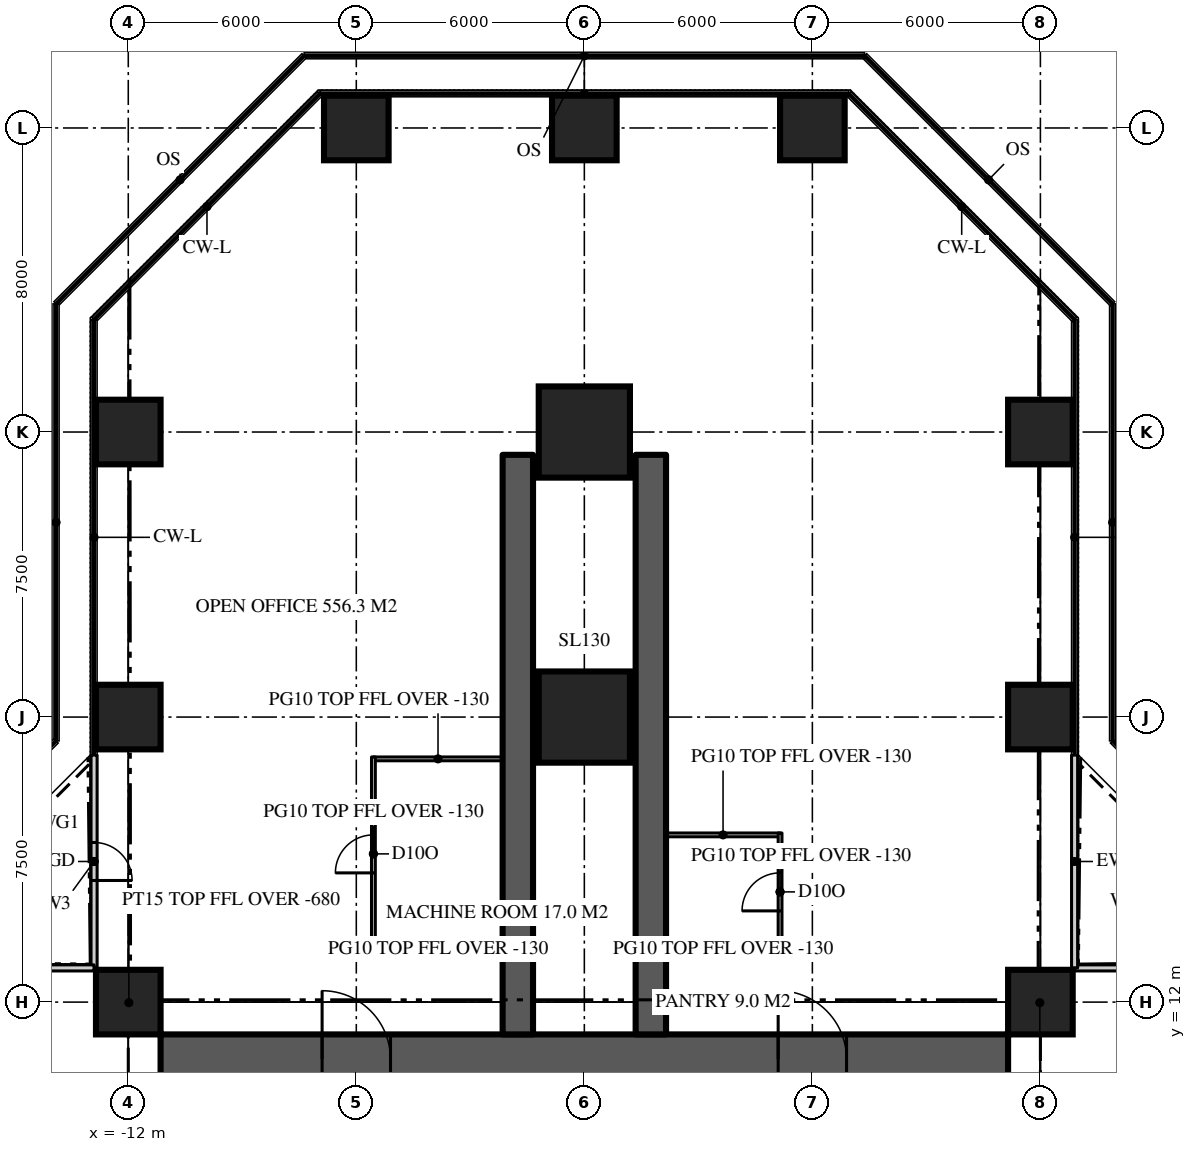
"""IFC4 building model, lengths in metres.
Left out: names, types, materials, properties, quantities, classifications, styles, units other than length and angle.
Written with IfcOpenShell. Run it as: python <this file> out.ifc"""

import sys

from ifc_helpers import new_model, si_unit, direction, frame, frame_2d, origin, origin_2d, place, context, subcontext, project, spatial, rectangle, extrude, element, fill, save


model = new_model("IFC4")
c1 = context("Model", 3, precision=1e-05, world=origin(), true_north=direction((0.0, 1.0)))
c2 = subcontext(c1, "Body", "Model", "MODEL_VIEW")
j1 = project(units=[si_unit("LENGTHUNIT", "METRE"), si_unit("PLANEANGLEUNIT", "RADIAN")], contexts=[c1])
p1 = place(None, origin())
s1 = spatial("IfcSite", under=j1, at=p1, CompositionType="ELEMENT")
p2 = place(p1, origin())
s2 = spatial("IfcBuilding", under=s1, at=p2, CompositionType="ELEMENT")
p3 = place(p2, frame((0.0, 0.0, 55.2)))
s3 = spatial("IfcBuildingStorey", under=s2, at=p3, CompositionType="ELEMENT", Elevation=55.2)
p4 = place(p3, frame((-11.15, 10.5, 0.0), z_axis=(0.0, 0.0, 1.0), x_axis=(1.0, 0.0, 0.0)))
e1 = element("IfcWall", 1, at=p4, inside=s3, PredefinedType="SHEAR", context=c2, shape_type="SweptSolid", body=[
    extrude(rectangle(XDim=22.3, YDim=1.3, at=frame_2d((11.15, 0.0))), origin(), (0.0, 0.0, 1.0), 3.9),
])
p5 = place(p4, frame((4.25, 0.0, 0.0)))
e2 = element("IfcOpeningElement", 2, at=p5, cuts=e1, PredefinedType="OPENING", context=c2, shape_type="SweptSolid", body=[
    extrude(rectangle(XDim=1.8, YDim=2.2, at=frame_2d((0.9, 1.1))), frame((0.0, 0.66, 0.0), z_axis=(0.0, -1.0, 0.0), x_axis=(1.0, 0.0, 0.0)), (0.0, 0.0, 1.0), 1.32),
])
p6 = place(p4, frame((16.25, 0.0, 0.0)))
e3 = element("IfcOpeningElement", 3, at=p6, cuts=e1, PredefinedType="OPENING", context=c2, shape_type="SweptSolid", body=[
    extrude(rectangle(XDim=1.8, YDim=2.2, at=frame_2d((0.9, 1.1))), frame((0.0, 0.66, 0.0), z_axis=(0.0, -1.0, 0.0), x_axis=(1.0, 0.0, 0.0)), (0.0, 0.0, 1.0), 1.32),
])
for number, where, z_axis, x_axis in (
    (4, (1.75, 11.15, 0.0), (0.0, 0.0, 1.0), (0.0, 1.0, 0.0)),
    (5, (-1.75, 11.15, 0.0), (0.0, 0.0, 1.0), (0.0, 1.0, 0.0)),
):
    element("IfcWall", number, at=place(p3, frame(where, z_axis=z_axis, x_axis=x_axis)), inside=s3, PredefinedType="SHEAR", context=c2, shape_type="SweptSolid", body=[
        extrude(rectangle(XDim=15.25, YDim=0.8, at=frame_2d((7.625, 0.0))), origin(), (0.0, 0.0, 1.0), 3.9),
    ])
for number, where, z_axis, x_axis in (
    (6, (-12.0, 12.0, 0.0), (0.0, 0.0, 1.0), (1.0, 0.0, 0.0)),
    (7, (12.0, 12.0, 0.0), (0.0, 0.0, 1.0), (1.0, 0.0, 0.0)),
    (8, (-12.0, 19.5, 0.0), (0.0, 0.0, 1.0), (1.0, 0.0, 0.0)),
):
    element("IfcColumn", number, at=place(p3, frame(where, z_axis=z_axis, x_axis=x_axis)), inside=s3, PredefinedType="COLUMN", context=c2, shape_type="SweptSolid", body=[
        extrude(rectangle(XDim=1.7, YDim=1.7, at=origin_2d()), origin(), (0.0, 0.0, 1.0), 3.9),
    ])
p7 = place(p3, frame((0.0, 19.5, 0.0), z_axis=(0.0, 0.0, 1.0), x_axis=(1.0, 0.0, 0.0)))
e9 = element("IfcColumn", 9, at=p7, inside=s3, PredefinedType="COLUMN", context=c2, shape_type="SweptSolid", body=[
    extrude(rectangle(XDim=2.4, YDim=2.4, at=origin_2d()), origin(), (0.0, 0.0, 1.0), 3.9),
])
for number, where, z_axis, x_axis in (
    (10, (12.0, 19.5, 0.0), (0.0, 0.0, 1.0), (1.0, 0.0, 0.0)),
    (11, (-12.0, 27.0, 0.0), (0.0, 0.0, 1.0), (1.0, 0.0, 0.0)),
):
    element("IfcColumn", number, at=place(p3, frame(where, z_axis=z_axis, x_axis=x_axis)), inside=s3, PredefinedType="COLUMN", context=c2, shape_type="SweptSolid", body=[
        extrude(rectangle(XDim=1.7, YDim=1.7, at=origin_2d()), origin(), (0.0, 0.0, 1.0), 3.9),
    ])
p8 = place(p3, frame((0.0, 27.0, 0.0), z_axis=(0.0, 0.0, 1.0), x_axis=(1.0, 0.0, 0.0)))
e12 = element("IfcColumn", 12, at=p8, inside=s3, PredefinedType="COLUMN", context=c2, shape_type="SweptSolid", body=[
    extrude(rectangle(XDim=2.4, YDim=2.4, at=origin_2d()), origin(), (0.0, 0.0, 1.0), 3.9),
])
for number, where, z_axis, x_axis in (
    (13, (12.0, 27.0, 0.0), (0.0, 0.0, 1.0), (1.0, 0.0, 0.0)),
    (14, (-6.0, 35.0, 0.0), (0.0, 0.0, 1.0), (1.0, 0.0, 0.0)),
    (15, (0.0, 35.0, 0.0), (0.0, 0.0, 1.0), (1.0, 0.0, 0.0)),
    (16, (6.0, 35.0, 0.0), (0.0, 0.0, 1.0), (1.0, 0.0, 0.0)),
):
    element("IfcColumn", number, at=place(p3, frame(where, z_axis=z_axis, x_axis=x_axis)), inside=s3, PredefinedType="COLUMN", context=c2, shape_type="SweptSolid", body=[
        extrude(rectangle(XDim=1.7, YDim=1.7, at=origin_2d()), origin(), (0.0, 0.0, 1.0), 3.9),
    ])
p9 = place(p3, frame((18.5, 12.9, 0.0), z_axis=(0.0, 0.0, 1.0), x_axis=(-1.0, 0.0, 0.0)))
e17 = element("IfcWall", 17, at=p9, inside=s3, PredefinedType="SOLIDWALL", context=c2, shape_type="SweptSolid", body=[
    extrude(rectangle(XDim=5.6, YDim=0.16, at=frame_2d((2.8, 0.0))), origin(), (0.0, 0.0, 1.0), 3.77),
])
p10 = place(p9, frame((2.3, 0.0, 0.0)))
e18 = element("IfcOpeningElement", 18, at=p10, cuts=e17, PredefinedType="OPENING", context=c2, shape_type="SweptSolid", body=[
    extrude(rectangle(XDim=1.0, YDim=2.2, at=frame_2d((0.5, 1.1))), frame((0.0, 0.09, 0.0), z_axis=(0.0, -1.0, 0.0), x_axis=(1.0, 0.0, 0.0)), (0.0, 0.0, 1.0), 0.18),
])
p11 = place(p3, frame((12.9, 12.9, 0.0), z_axis=(0.0, 0.0, 1.0), x_axis=(0.0, 1.0, 0.0)))
e19 = element("IfcWall", 19, at=p11, inside=s3, PredefinedType="SOLIDWALL", context=c2, shape_type="SweptSolid", body=[
    extrude(rectangle(XDim=5.6, YDim=0.16, at=frame_2d((2.8, 0.0))), origin(), (0.0, 0.0, 1.0), 3.77),
])
p12 = place(p3, frame((-12.9, 18.5, 0.0), z_axis=(0.0, 0.0, 1.0), x_axis=(0.0, -1.0, 0.0)))
e20 = element("IfcWall", 20, at=p12, inside=s3, PredefinedType="SOLIDWALL", context=c2, shape_type="SweptSolid", body=[
    extrude(rectangle(XDim=5.6, YDim=0.16, at=frame_2d((2.8, 0.0))), origin(), (0.0, 0.0, 1.0), 3.77),
])
p13 = place(p12, frame((2.3, 0.0, 0.0)))
e21 = element("IfcOpeningElement", 21, at=p13, cuts=e20, PredefinedType="OPENING", context=c2, shape_type="SweptSolid", body=[
    extrude(rectangle(XDim=1.0, YDim=2.2, at=frame_2d((0.5, 1.1))), frame((0.0, 0.09, 0.0), z_axis=(0.0, -1.0, 0.0), x_axis=(1.0, 0.0, 0.0)), (0.0, 0.0, 1.0), 0.18),
])
p14 = place(p3, frame((-12.9, 12.9, 0.0), z_axis=(0.0, 0.0, 1.0), x_axis=(-1.0, 0.0, 0.0)))
e22 = element("IfcWall", 22, at=p14, inside=s3, PredefinedType="SOLIDWALL", context=c2, shape_type="SweptSolid", body=[
    extrude(rectangle(XDim=5.6, YDim=0.16, at=frame_2d((2.8, 0.0))), origin(), (0.0, 0.0, 1.0), 3.77),
])
for number, where, z_axis, x_axis in (
    (23, (-2.15, 13.4, 0.0), (0.0, 0.0, 1.0), (-1.0, 0.0, 0.0)),
    (24, (-2.15, 18.4, 0.0), (0.0, 0.0, 1.0), (-1.0, 0.0, 0.0)),
):
    element("IfcWall", number, at=place(p3, frame(where, z_axis=z_axis, x_axis=x_axis)), inside=s3, PredefinedType="PARTITIONING", context=c2, shape_type="SweptSolid", body=[
        extrude(rectangle(XDim=3.4, YDim=0.1, at=frame_2d((1.7, 0.0))), origin(), (0.0, 0.0, 1.0), 3.77),
    ])
p15 = place(p3, frame((-5.55, 13.35, 0.0), z_axis=(0.0, 0.0, 1.0), x_axis=(0.0, 1.0, 0.0)))
e25 = element("IfcWall", 25, at=p15, inside=s3, PredefinedType="PARTITIONING", context=c2, shape_type="SweptSolid", body=[
    extrude(rectangle(XDim=5.1, YDim=0.1, at=frame_2d((2.55, 0.0))), origin(), (0.0, 0.0, 1.0), 3.77),
])
p16 = place(p15, frame((2.05, 0.0, 0.0)))
e26 = element("IfcOpeningElement", 26, at=p16, cuts=e25, PredefinedType="OPENING", context=c2, shape_type="SweptSolid", body=[
    extrude(rectangle(XDim=1.0, YDim=2.2, at=frame_2d((0.5, 1.1))), frame((0.0, 0.06, 0.0), z_axis=(0.0, -1.0, 0.0), x_axis=(1.0, 0.0, 0.0)), (0.0, 0.0, 1.0), 0.12),
])
for number, where, z_axis, x_axis in (
    (27, (2.15, 13.4, 0.0), (0.0, 0.0, 1.0), (1.0, 0.0, 0.0)),
    (28, (2.15, 16.4, 0.0), (0.0, 0.0, 1.0), (1.0, 0.0, 0.0)),
):
    element("IfcWall", number, at=place(p3, frame(where, z_axis=z_axis, x_axis=x_axis)), inside=s3, PredefinedType="PARTITIONING", context=c2, shape_type="SweptSolid", body=[
        extrude(rectangle(XDim=3.0, YDim=0.1, at=frame_2d((1.5, 0.0))), origin(), (0.0, 0.0, 1.0), 3.77),
    ])
p17 = place(p3, frame((5.15, 13.35, 0.0), z_axis=(0.0, 0.0, 1.0), x_axis=(0.0, 1.0, 0.0)))
e29 = element("IfcWall", 29, at=p17, inside=s3, PredefinedType="PARTITIONING", context=c2, shape_type="SweptSolid", body=[
    extrude(rectangle(XDim=3.1, YDim=0.1, at=frame_2d((1.55, 0.0))), origin(), (0.0, 0.0, 1.0), 3.77),
])
p18 = place(p17, frame((1.05, 0.0, 0.0)))
e30 = element("IfcOpeningElement", 30, at=p18, cuts=e29, PredefinedType="OPENING", context=c2, shape_type="SweptSolid", body=[
    extrude(rectangle(XDim=1.0, YDim=2.2, at=frame_2d((0.5, 1.1))), frame((0.0, 0.06, 0.0), z_axis=(0.0, -1.0, 0.0), x_axis=(1.0, 0.0, 0.0)), (0.0, 0.0, 1.0), 0.12),
])
for number, where, z_axis, x_axis in (
    (31, (11.15, 11.15, 0.0), (0.0, 0.0, 1.0), (0.707, 0.707, 0.0)),
    (32, (-11.15, 11.15, 0.0), (0.0, 0.0, 1.0), (-0.707, 0.707, 0.0)),
):
    element("IfcWall", number, at=place(p3, frame(where, z_axis=z_axis, x_axis=x_axis)), inside=s3, PredefinedType="PARTITIONING", context=c2, shape_type="SweptSolid", body=[
        extrude(rectangle(XDim=2.362, YDim=0.15, at=frame_2d((1.181, 0.0))), origin(), (0.0, 0.0, 1.0), 3.22),
    ])
p19 = place(p13, origin())
e33 = element("IfcDoor", 33, at=p19, inside=s3, OperationType="SINGLE_SWING_RIGHT", PredefinedType="DOOR", context=c2, shape_type="SweptSolid", body=[
    extrude(rectangle(XDim=1.0, YDim=2.2, at=frame_2d((0.5, 1.1))), frame((0.0, 0.025, 0.0), z_axis=(0.0, -1.0, 0.0), x_axis=(1.0, 0.0, 0.0)), (0.0, 0.0, 1.0), 0.05),
])
fill(e21, e33)
p20 = place(p5, origin())
e34 = element("IfcDoor", 34, at=p20, inside=s3, OperationType="DOUBLE_DOOR_DOUBLE_SWING", PredefinedType="DOOR", context=c2, shape_type="SweptSolid", body=[
    extrude(rectangle(XDim=1.8, YDim=2.2, at=frame_2d((0.9, 1.1))), frame((0.0, 0.025, 0.0), z_axis=(0.0, -1.0, 0.0), x_axis=(1.0, 0.0, 0.0)), (0.0, 0.0, 1.0), 0.05),
])
fill(e2, e34)
p21 = place(p6, origin())
e35 = element("IfcDoor", 35, at=p21, inside=s3, OperationType="DOUBLE_DOOR_DOUBLE_SWING", PredefinedType="DOOR", context=c2, shape_type="SweptSolid", body=[
    extrude(rectangle(XDim=1.8, YDim=2.2, at=frame_2d((0.9, 1.1))), frame((0.0, 0.025, 0.0), z_axis=(0.0, -1.0, 0.0), x_axis=(1.0, 0.0, 0.0)), (0.0, 0.0, 1.0), 0.05),
])
fill(e3, e35)
p22 = place(p16, origin())
e36 = element("IfcDoor", 36, at=p22, inside=s3, OperationType="SINGLE_SWING_LEFT", PredefinedType="DOOR", context=c2, shape_type="SweptSolid", body=[
    extrude(rectangle(XDim=1.0, YDim=2.2, at=frame_2d((0.5, 1.1))), frame((0.0, 0.025, 0.0), z_axis=(0.0, -1.0, 0.0), x_axis=(1.0, 0.0, 0.0)), (0.0, 0.0, 1.0), 0.05),
])
fill(e26, e36)
p23 = place(p18, origin())
e37 = element("IfcDoor", 37, at=p23, inside=s3, OperationType="SINGLE_SWING_LEFT", PredefinedType="DOOR", context=c2, shape_type="SweptSolid", body=[
    extrude(rectangle(XDim=1.0, YDim=2.2, at=frame_2d((0.5, 1.1))), frame((0.0, 0.025, 0.0), z_axis=(0.0, -1.0, 0.0), x_axis=(1.0, 0.0, 0.0)), (0.0, 0.0, 1.0), 0.05),
])
fill(e30, e37)
save(model, sys.argv[1])
